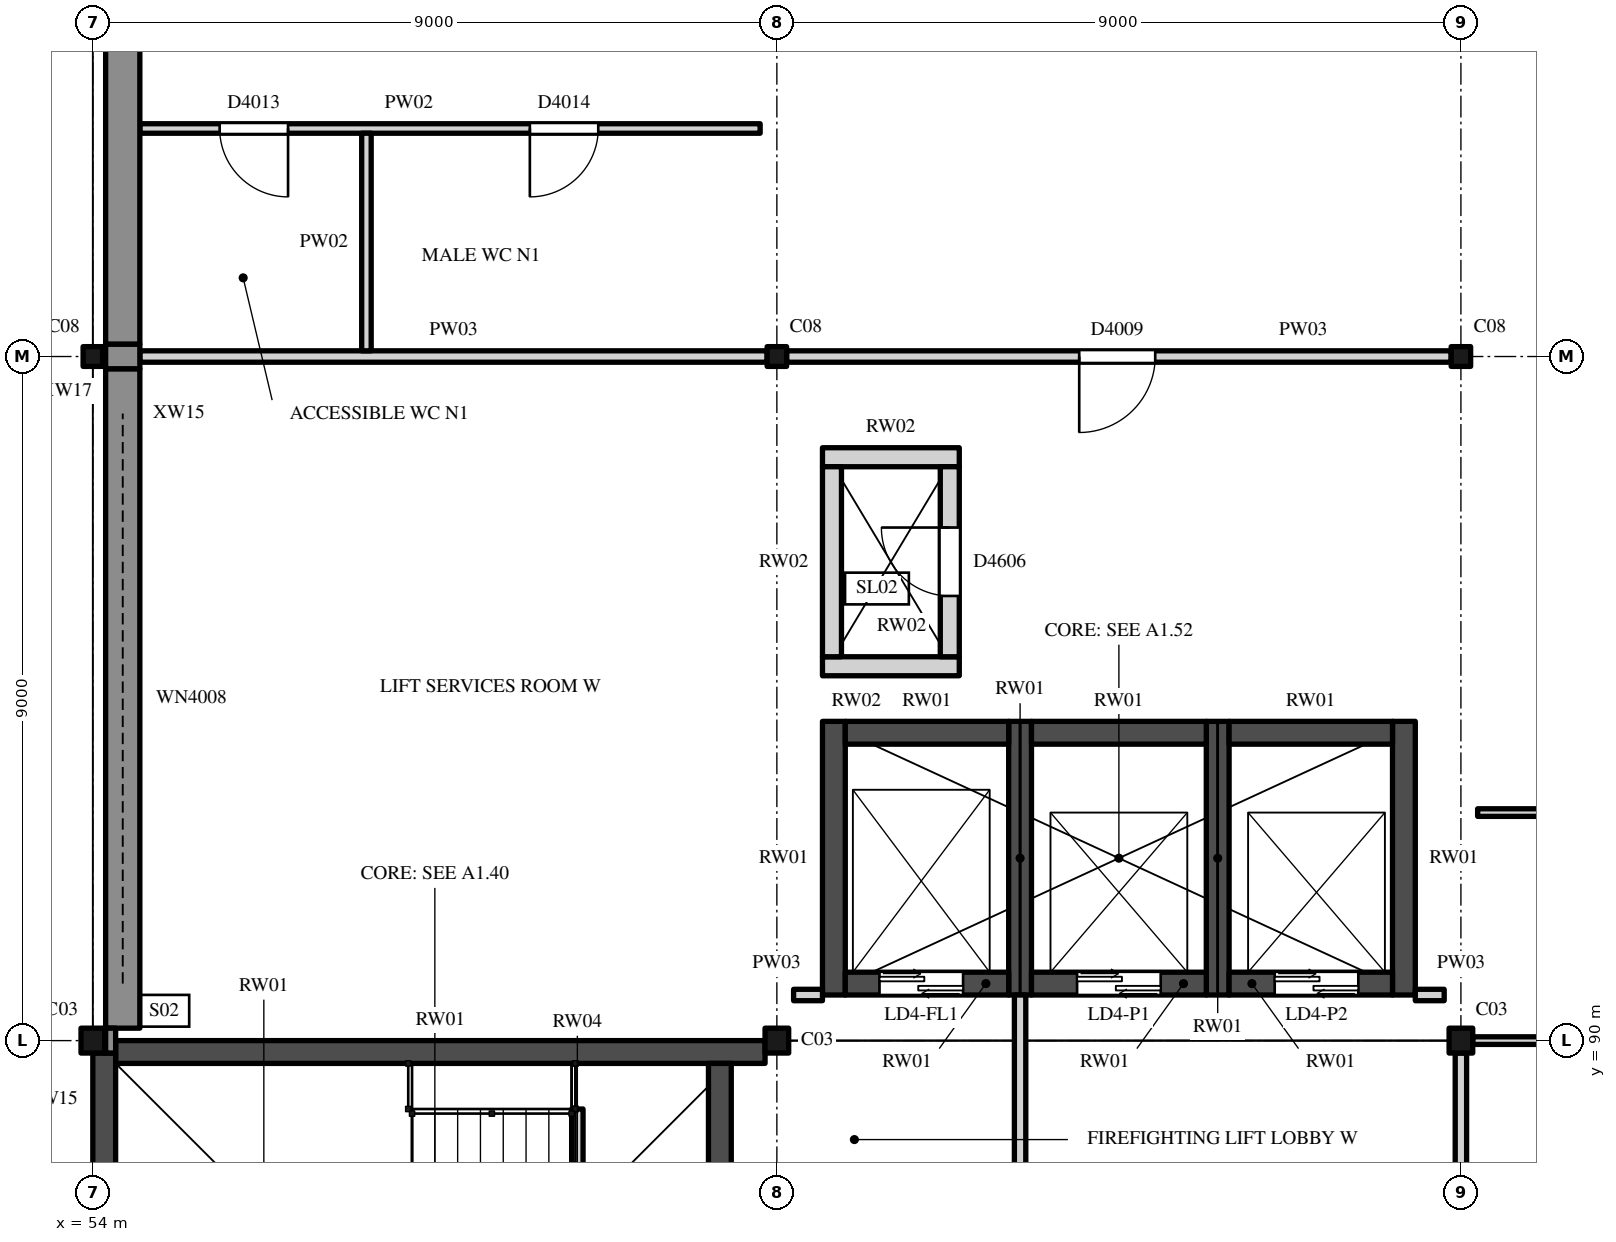
"""IFC4 building model, lengths in metres.
Left out: names, types, materials, properties, quantities, classifications, styles, units other than length and angle.
Written with IfcOpenShell. Run it as: python <this file> out.ifc"""

import sys

from ifc_helpers import new_model, si_unit, direction, frame, frame_2d, origin, origin_2d, place, context, subcontext, project, spatial, rectangle, i_section, extrude, element, fill, save


model = new_model("IFC4")
c1 = context("Model", 3, precision=1e-05, world=origin(), true_north=direction((0.0, 1.0)))
c2 = subcontext(c1, "Body", "Model", "MODEL_VIEW")
j1 = project(units=[si_unit("LENGTHUNIT", "METRE"), si_unit("PLANEANGLEUNIT", "RADIAN")], contexts=[c1])
p1 = place(None, origin())
s1 = spatial("IfcSite", under=j1, at=p1, CompositionType="ELEMENT")
p2 = place(p1, origin())
s2 = spatial("IfcBuilding", under=s1, at=p2, CompositionType="ELEMENT")
p3 = place(p2, frame((0.0, 0.0, 26.0)))
s3 = spatial("IfcBuildingStorey", under=s2, at=p3, CompositionType="ELEMENT", Elevation=26.0)
for number, where, z_axis, x_axis in (
    (1, (54.0, 90.0, 0.0), (0.0, 0.0, 1.0), (1.0, 0.0, 0.0)),
    (2, (63.0, 90.0, 0.0), (0.0, 0.0, 1.0), (1.0, 0.0, 0.0)),
    (3, (72.0, 90.0, 0.0), (0.0, 0.0, 1.0), (1.0, 0.0, 0.0)),
):
    element("IfcColumn", number, at=place(p3, frame(where, z_axis=z_axis, x_axis=x_axis)), inside=s3, PredefinedType="COLUMN", context=c2, shape_type="SweptSolid", body=[
        extrude(i_section(OverallWidth=0.311, OverallDepth=0.327, WebThickness=0.016, FlangeThickness=0.025, FilletRadius=0.017, at=origin_2d()), origin(), (0.0, 0.0, 1.0), 5.0),
    ])
for number, where, z_axis, x_axis in (
    (4, (54.0, 99.0, 0.0), (0.0, 0.0, 1.0), (1.0, 0.0, 0.0)),
    (5, (63.0, 99.0, 0.0), (0.0, 0.0, 1.0), (1.0, 0.0, 0.0)),
    (6, (72.0, 99.0, 0.0), (0.0, 0.0, 1.0), (1.0, 0.0, 0.0)),
):
    element("IfcColumn", number, at=place(p3, frame(where, z_axis=z_axis, x_axis=x_axis)), inside=s3, PredefinedType="COLUMN", context=c2, shape_type="SweptSolid", body=[
        extrude(i_section(OverallWidth=0.256, OverallDepth=0.26, WebThickness=0.01, FlangeThickness=0.017, FilletRadius=0.014, at=origin_2d()), origin(), (0.0, 0.0, 1.0), 5.0),
    ])
p4 = place(p3, frame((54.3, 89.85, 0.0), z_axis=(0.0, 0.0, 1.0), x_axis=(1.0, 0.0, 0.0)))
e7 = element("IfcWall", 7, at=p4, inside=s3, PredefinedType="SHEAR", context=c2, shape_type="SweptSolid", body=[
    extrude(rectangle(XDim=8.544, YDim=0.3, at=frame_2d((4.272, 0.0))), origin(), (0.0, 0.0, 1.0), 5.0),
])
p5 = place(p3, frame((54.15, 81.125, 0.0), z_axis=(0.0, 0.0, 1.0), x_axis=(0.0, 1.0, 0.0)))
e8 = element("IfcWall", 8, at=p5, inside=s3, PredefinedType="SHEAR", context=c2, shape_type="SweptSolid", body=[
    extrude(rectangle(XDim=8.711, YDim=0.3, at=frame_2d((4.356, 0.0))), origin(), (0.0, 0.0, 1.0), 5.0),
])
p6 = place(p3, frame((62.25, 81.9, 0.0), z_axis=(0.0, 0.0, 1.0), x_axis=(0.0, 1.0, 0.0)))
e9 = element("IfcWall", 9, at=p6, inside=s3, PredefinedType="SHEAR", context=c2, shape_type="SweptSolid", body=[
    extrude(rectangle(XDim=7.8, YDim=0.3, at=frame_2d((3.9, 0.0))), origin(), (0.0, 0.0, 1.0), 5.0),
])
p7 = place(p6, frame((3.0, 0.0, 0.0)))
e10 = element("IfcOpeningElement", 10, at=p7, cuts=e9, PredefinedType="OPENING", context=c2, shape_type="SweptSolid", body=[
    extrude(rectangle(XDim=1.2, YDim=2.1, at=frame_2d((0.6, 1.05))), frame((0.0, 0.16, 0.0), z_axis=(0.0, -1.0, 0.0), x_axis=(1.0, 0.0, 0.0)), (0.0, 0.0, 1.0), 0.32),
])
p8 = place(p3, frame((60.375, 85.5, 0.0), z_axis=(0.0, 0.0, 1.0), x_axis=(0.0, 1.0, 0.0)))
e11 = element("IfcWall", 11, at=p8, inside=s3, PredefinedType="STANDARD", context=c2, shape_type="SweptSolid", body=[
    extrude(rectangle(XDim=3.6, YDim=0.15, at=frame_2d((1.8, 0.0))), origin(), (0.0, 0.0, 1.0), 2.3),
])
for number, where, z_axis, x_axis in (
    (12, (63.75, 90.6, 0.0), (0.0, 0.0, 1.0), (0.0, 1.0, 0.0)),
    (13, (66.2, 90.6, 0.0), (0.0, 0.0, 1.0), (0.0, 1.0, 0.0)),
    (14, (68.8, 90.6, 0.0), (0.0, 0.0, 1.0), (0.0, 1.0, 0.0)),
    (15, (71.25, 90.6, 0.0), (0.0, 0.0, 1.0), (0.0, 1.0, 0.0)),
):
    element("IfcWall", number, at=place(p3, frame(where, z_axis=z_axis, x_axis=x_axis)), inside=s3, PredefinedType="SHEAR", context=c2, shape_type="SweptSolid", body=[
        extrude(rectangle(XDim=3.6, YDim=0.3, at=frame_2d((1.8, 0.0))), origin(), (0.0, 0.0, 1.0), 5.0),
    ])
p9 = place(p3, frame((63.9, 90.75, 0.0), z_axis=(0.0, 0.0, 1.0), x_axis=(1.0, 0.0, 0.0)))
e16 = element("IfcWall", 16, at=p9, inside=s3, PredefinedType="SHEAR", context=c2, shape_type="SweptSolid", body=[
    extrude(rectangle(XDim=2.15, YDim=0.3, at=frame_2d((1.075, 0.0))), origin(), (0.0, 0.0, 1.0), 5.0),
])
p10 = place(p9, frame((0.45, 0.0, 0.0)))
e17 = element("IfcOpeningElement", 17, at=p10, cuts=e16, PredefinedType="OPENING", context=c2, shape_type="SweptSolid", body=[
    extrude(rectangle(XDim=1.1, YDim=2.1, at=frame_2d((0.55, 1.05))), frame((0.0, 0.16, 0.0), z_axis=(0.0, -1.0, 0.0), x_axis=(1.0, 0.0, 0.0)), (0.0, 0.0, 1.0), 0.32),
])
p11 = place(p3, frame((63.9, 94.05, 0.0), z_axis=(0.0, 0.0, 1.0), x_axis=(1.0, 0.0, 0.0)))
e18 = element("IfcWall", 18, at=p11, inside=s3, PredefinedType="SHEAR", context=c2, shape_type="SweptSolid", body=[
    extrude(rectangle(XDim=2.15, YDim=0.3, at=frame_2d((1.075, 0.0))), origin(), (0.0, 0.0, 1.0), 5.0),
])
p12 = place(p3, frame((66.35, 90.75, 0.0), z_axis=(0.0, 0.0, 1.0), x_axis=(1.0, 0.0, 0.0)))
e19 = element("IfcWall", 19, at=p12, inside=s3, PredefinedType="SHEAR", context=c2, shape_type="SweptSolid", body=[
    extrude(rectangle(XDim=2.3, YDim=0.3, at=frame_2d((1.15, 0.0))), origin(), (0.0, 0.0, 1.0), 5.0),
])
p13 = place(p12, frame((0.6, 0.0, 0.0)))
e20 = element("IfcOpeningElement", 20, at=p13, cuts=e19, PredefinedType="OPENING", context=c2, shape_type="SweptSolid", body=[
    extrude(rectangle(XDim=1.1, YDim=2.1, at=frame_2d((0.55, 1.05))), frame((0.0, 0.16, 0.0), z_axis=(0.0, -1.0, 0.0), x_axis=(1.0, 0.0, 0.0)), (0.0, 0.0, 1.0), 0.32),
])
p14 = place(p3, frame((66.35, 94.05, 0.0), z_axis=(0.0, 0.0, 1.0), x_axis=(1.0, 0.0, 0.0)))
e21 = element("IfcWall", 21, at=p14, inside=s3, PredefinedType="SHEAR", context=c2, shape_type="SweptSolid", body=[
    extrude(rectangle(XDim=2.3, YDim=0.3, at=frame_2d((1.15, 0.0))), origin(), (0.0, 0.0, 1.0), 5.0),
])
p15 = place(p3, frame((68.95, 90.75, 0.0), z_axis=(0.0, 0.0, 1.0), x_axis=(1.0, 0.0, 0.0)))
e22 = element("IfcWall", 22, at=p15, inside=s3, PredefinedType="SHEAR", context=c2, shape_type="SweptSolid", body=[
    extrude(rectangle(XDim=2.15, YDim=0.3, at=frame_2d((1.075, 0.0))), origin(), (0.0, 0.0, 1.0), 5.0),
])
p16 = place(p15, frame((0.6, 0.0, 0.0)))
e23 = element("IfcOpeningElement", 23, at=p16, cuts=e22, PredefinedType="OPENING", context=c2, shape_type="SweptSolid", body=[
    extrude(rectangle(XDim=1.1, YDim=2.1, at=frame_2d((0.55, 1.05))), frame((0.0, 0.16, 0.0), z_axis=(0.0, -1.0, 0.0), x_axis=(1.0, 0.0, 0.0)), (0.0, 0.0, 1.0), 0.32),
])
p17 = place(p3, frame((68.95, 94.05, 0.0), z_axis=(0.0, 0.0, 1.0), x_axis=(1.0, 0.0, 0.0)))
e24 = element("IfcWall", 24, at=p17, inside=s3, PredefinedType="SHEAR", context=c2, shape_type="SweptSolid", body=[
    extrude(rectangle(XDim=2.15, YDim=0.3, at=frame_2d((1.075, 0.0))), origin(), (0.0, 0.0, 1.0), 5.0),
])
for number, where, z_axis, x_axis in (
    (25, (63.6, 94.925, 0.0), (0.0, 0.0, 1.0), (1.0, 0.0, 0.0)),
    (26, (63.6, 97.675, 0.0), (0.0, 0.0, 1.0), (1.0, 0.0, 0.0)),
):
    element("IfcWall", number, at=place(p3, frame(where, z_axis=z_axis, x_axis=x_axis)), inside=s3, PredefinedType="STANDARD", context=c2, shape_type="SweptSolid", body=[
        extrude(rectangle(XDim=1.8, YDim=0.25, at=frame_2d((0.9, 0.0))), origin(), (0.0, 0.0, 1.0), 5.0),
    ])
p18 = place(p3, frame((63.725, 95.05, 0.0), z_axis=(0.0, 0.0, 1.0), x_axis=(0.0, 1.0, 0.0)))
e27 = element("IfcWall", 27, at=p18, inside=s3, PredefinedType="STANDARD", context=c2, shape_type="SweptSolid", body=[
    extrude(rectangle(XDim=2.5, YDim=0.25, at=frame_2d((1.25, 0.0))), origin(), (0.0, 0.0, 1.0), 5.0),
])
p19 = place(p3, frame((65.275, 95.05, 0.0), z_axis=(0.0, 0.0, 1.0), x_axis=(0.0, 1.0, 0.0)))
e28 = element("IfcWall", 28, at=p19, inside=s3, PredefinedType="STANDARD", context=c2, shape_type="SweptSolid", body=[
    extrude(rectangle(XDim=2.5, YDim=0.25, at=frame_2d((1.25, 0.0))), origin(), (0.0, 0.0, 1.0), 5.0),
])
p20 = place(p19, frame((0.8, 0.0, 0.0)))
e29 = element("IfcOpeningElement", 29, at=p20, cuts=e28, PredefinedType="OPENING", context=c2, shape_type="SweptSolid", body=[
    extrude(rectangle(XDim=0.9, YDim=2.1, at=frame_2d((0.45, 1.05))), frame((0.0, 0.135, 0.0), z_axis=(0.0, -1.0, 0.0), x_axis=(1.0, 0.0, 0.0)), (0.0, 0.0, 1.0), 0.27),
])
p21 = place(p3, frame((54.394, 90.164, 0.0), z_axis=(0.0, 0.0, 1.0), x_axis=(0.0, 1.0, 0.0)))
e30 = element("IfcWall", 30, at=p21, inside=s3, PredefinedType="SOLIDWALL", context=c2, shape_type="SweptSolid", body=[
    extrude(rectangle(XDim=8.676, YDim=0.45, at=frame_2d((4.338, 0.0))), origin(), (0.0, 0.0, 1.0), 4.498),
])
p22 = place(p21, frame((0.586, 0.0, 1.6)))
e31 = element("IfcOpeningElement", 31, at=p22, cuts=e30, PredefinedType="OPENING", context=c2, shape_type="SweptSolid", body=[
    extrude(rectangle(XDim=7.5, YDim=1.2, at=frame_2d((3.75, 0.6))), frame((0.0, 0.235, 0.0), z_axis=(0.0, -1.0, 0.0), x_axis=(1.0, 0.0, 0.0)), (0.0, 0.0, 1.0), 0.47),
])
p23 = place(p3, frame((54.394, 99.161, 0.0), z_axis=(0.0, 0.0, 1.0), x_axis=(0.0, 1.0, 0.0)))
e32 = element("IfcWall", 32, at=p23, inside=s3, PredefinedType="SOLIDWALL", context=c2, shape_type="SweptSolid", body=[
    extrude(rectangle(XDim=8.678, YDim=0.45, at=frame_2d((4.339, 0.0))), origin(), (0.0, 0.0, 1.0), 4.498),
])
p24 = place(p3, frame((54.234, 89.836, 0.0), z_axis=(0.0, 0.0, 1.0), x_axis=(0.0, 1.0, 0.0)))
e33 = element("IfcWall", 33, at=p24, inside=s3, PredefinedType="SOLIDWALL", context=c2, shape_type="SweptSolid", body=[
    extrude(rectangle(XDim=0.327, YDim=0.131, at=frame_2d((0.164, 0.0))), origin(), (0.0, 0.0, 1.0), 5.0),
])
p25 = place(p3, frame((54.394, 98.839, 0.0), z_axis=(0.0, 0.0, 1.0), x_axis=(0.0, 1.0, 0.0)))
e34 = element("IfcWall", 34, at=p25, inside=s3, PredefinedType="SOLIDWALL", context=c2, shape_type="SweptSolid", body=[
    extrude(rectangle(XDim=0.322, YDim=0.45, at=frame_2d((0.161, 0.0))), origin(), (0.0, 0.0, 1.0), 4.498),
])
p26 = place(p3, frame((72.156, 90.0, 0.0), z_axis=(0.0, 0.0, 1.0), x_axis=(1.0, 0.0, 0.0)))
e35 = element("IfcWall", 35, at=p26, inside=s3, PredefinedType="PARTITIONING", context=c2, shape_type="SweptSolid", body=[
    extrude(rectangle(XDim=8.689, YDim=0.1, at=frame_2d((4.344, 0.0))), origin(), (0.0, 0.0, 1.0), 4.518),
])
p27 = place(p26, frame((3.15, 0.0, 0.0)))
e36 = element("IfcOpeningElement", 36, at=p27, cuts=e35, PredefinedType="OPENING", context=c2, shape_type="SweptSolid", body=[
    extrude(rectangle(XDim=2.4, YDim=2.4, at=frame_2d((1.2, 1.2))), frame((0.0, 0.06, 0.0), z_axis=(0.0, -1.0, 0.0), x_axis=(1.0, 0.0, 0.0)), (0.0, 0.0, 1.0), 0.12),
])
for number, where, z_axis, x_axis in (
    (37, (63.22, 90.6, 0.0), (0.0, 0.0, 1.0), (1.0, 0.0, 0.0)),
    (38, (71.4, 90.6, 0.0), (0.0, 0.0, 1.0), (1.0, 0.0, 0.0)),
):
    element("IfcWall", number, at=place(p3, frame(where, z_axis=z_axis, x_axis=x_axis)), inside=s3, PredefinedType="PARTITIONING", context=c2, shape_type="SweptSolid", body=[
        extrude(rectangle(XDim=0.38, YDim=0.15, at=frame_2d((0.19, 0.0))), origin(), (0.0, 0.0, 1.0), 4.825),
    ])
p28 = place(p3, frame((72.22, 93.0, 0.0), z_axis=(0.0, 0.0, 1.0), x_axis=(1.0, 0.0, 0.0)))
e39 = element("IfcWall", 39, at=p28, inside=s3, PredefinedType="PARTITIONING", context=c2, shape_type="SweptSolid", body=[
    extrude(rectangle(XDim=8.56, YDim=0.1, at=frame_2d((4.28, 0.0))), origin(), (0.0, 0.0, 1.0), 4.521),
])
p29 = place(p3, frame((54.619, 99.0, 0.0), z_axis=(0.0, 0.0, 1.0), x_axis=(1.0, 0.0, 0.0)))
e40 = element("IfcWall", 40, at=p29, inside=s3, PredefinedType="PARTITIONING", context=c2, shape_type="SweptSolid", body=[
    extrude(rectangle(XDim=8.253, YDim=0.15, at=frame_2d((4.127, 0.0))), origin(), (0.0, 0.0, 1.0), 4.518),
])
p30 = place(p3, frame((63.128, 99.0, 0.0), z_axis=(0.0, 0.0, 1.0), x_axis=(1.0, 0.0, 0.0)))
e41 = element("IfcWall", 41, at=p30, inside=s3, PredefinedType="PARTITIONING", context=c2, shape_type="SweptSolid", body=[
    extrude(rectangle(XDim=8.744, YDim=0.15, at=frame_2d((4.372, 0.0))), origin(), (0.0, 0.0, 1.0), 4.518),
])
p31 = place(p30, frame((3.85, 0.0, 0.0)))
e42 = element("IfcOpeningElement", 42, at=p31, cuts=e41, PredefinedType="OPENING", context=c2, shape_type="SweptSolid", body=[
    extrude(rectangle(XDim=1.0, YDim=2.4, at=frame_2d((0.5, 1.2))), frame((0.0, 0.085, 0.0), z_axis=(0.0, -1.0, 0.0), x_axis=(1.0, 0.0, 0.0)), (0.0, 0.0, 1.0), 0.17),
])
p32 = place(p3, frame((54.619, 102.0, 0.0), z_axis=(0.0, 0.0, 1.0), x_axis=(1.0, 0.0, 0.0)))
e43 = element("IfcWall", 43, at=p32, inside=s3, PredefinedType="PARTITIONING", context=c2, shape_type="SweptSolid", body=[
    extrude(rectangle(XDim=8.161, YDim=0.125, at=frame_2d((4.081, 0.0))), origin(), (0.0, 0.0, 1.0), 4.521),
])
p33 = place(p32, frame((1.05, 0.0, 0.0)))
e44 = element("IfcOpeningElement", 44, at=p33, cuts=e43, PredefinedType="OPENING", context=c2, shape_type="SweptSolid", body=[
    extrude(rectangle(XDim=0.9, YDim=2.1, at=frame_2d((0.45, 1.05))), frame((0.0, 0.073, 0.0), z_axis=(0.0, -1.0, 0.0), x_axis=(1.0, 0.0, 0.0)), (0.0, 0.0, 1.0), 0.145),
])
p34 = place(p32, frame((5.131, 0.0, 0.0)))
e45 = element("IfcOpeningElement", 45, at=p34, cuts=e43, PredefinedType="OPENING", context=c2, shape_type="SweptSolid", body=[
    extrude(rectangle(XDim=0.9, YDim=2.1, at=frame_2d((0.45, 1.05))), frame((0.0, 0.073, 0.0), z_axis=(0.0, -1.0, 0.0), x_axis=(1.0, 0.0, 0.0)), (0.0, 0.0, 1.0), 0.145),
])
p35 = place(p3, frame((57.6, 99.075, 0.0), z_axis=(0.0, 0.0, 1.0), x_axis=(0.0, 1.0, 0.0)))
e46 = element("IfcWall", 46, at=p35, inside=s3, PredefinedType="PARTITIONING", context=c2, shape_type="SweptSolid", body=[
    extrude(rectangle(XDim=2.863, YDim=0.125, at=frame_2d((1.431, 0.0))), origin(), (0.0, 0.0, 1.0), 4.825),
])
p36 = place(p3, frame((66.2, 84.075, 0.0), z_axis=(0.0, 0.0, 1.0), x_axis=(0.0, 1.0, 0.0)))
e47 = element("IfcWall", 47, at=p36, inside=s3, PredefinedType="PARTITIONING", context=c2, shape_type="SweptSolid", body=[
    extrude(rectangle(XDim=6.525, YDim=0.15, at=frame_2d((3.263, 0.0))), origin(), (0.0, 0.0, 1.0), 4.825),
])
p37 = place(p36, frame((2.85, 0.0, 0.0)))
e48 = element("IfcOpeningElement", 48, at=p37, cuts=e47, PredefinedType="OPENING", context=c2, shape_type="SweptSolid", body=[
    extrude(rectangle(XDim=0.9, YDim=2.1, at=frame_2d((0.45, 1.05))), frame((0.0, 0.085, 0.0), z_axis=(0.0, -1.0, 0.0), x_axis=(1.0, 0.0, 0.0)), (0.0, 0.0, 1.0), 0.17),
])
p38 = place(p3, frame((72.0, 84.075, 0.0), z_axis=(0.0, 0.0, 1.0), x_axis=(0.0, 1.0, 0.0)))
e49 = element("IfcWall", 49, at=p38, inside=s3, PredefinedType="PARTITIONING", context=c2, shape_type="SweptSolid", body=[
    extrude(rectangle(XDim=5.761, YDim=0.15, at=frame_2d((2.881, 0.0))), origin(), (0.0, 0.0, 1.0), 4.419),
])
p39 = place(p10, origin())
e50 = element("IfcDoor", 50, at=p39, inside=s3, OperationType="DOUBLE_DOOR_SLIDING", PredefinedType="DOOR", context=c2, shape_type="SweptSolid", body=[
    extrude(rectangle(XDim=1.1, YDim=2.1, at=frame_2d((0.55, 1.05))), frame((0.0, 0.025, 0.0), z_axis=(0.0, -1.0, 0.0), x_axis=(1.0, 0.0, 0.0)), (0.0, 0.0, 1.0), 0.05),
])
fill(e17, e50)
p40 = place(p13, origin())
e51 = element("IfcDoor", 51, at=p40, inside=s3, OperationType="DOUBLE_DOOR_SLIDING", PredefinedType="DOOR", context=c2, shape_type="SweptSolid", body=[
    extrude(rectangle(XDim=1.1, YDim=2.1, at=frame_2d((0.55, 1.05))), frame((0.0, 0.025, 0.0), z_axis=(0.0, -1.0, 0.0), x_axis=(1.0, 0.0, 0.0)), (0.0, 0.0, 1.0), 0.05),
])
fill(e20, e51)
p41 = place(p16, origin())
e52 = element("IfcDoor", 52, at=p41, inside=s3, OperationType="DOUBLE_DOOR_SLIDING", PredefinedType="DOOR", context=c2, shape_type="SweptSolid", body=[
    extrude(rectangle(XDim=1.1, YDim=2.1, at=frame_2d((0.55, 1.05))), frame((0.0, 0.025, 0.0), z_axis=(0.0, -1.0, 0.0), x_axis=(1.0, 0.0, 0.0)), (0.0, 0.0, 1.0), 0.05),
])
fill(e23, e52)
p42 = place(p20, origin())
e53 = element("IfcDoor", 53, at=p42, inside=s3, OperationType="SINGLE_SWING_LEFT", PredefinedType="DOOR", context=c2, shape_type="SweptSolid", body=[
    extrude(rectangle(XDim=0.9, YDim=2.1, at=frame_2d((0.45, 1.05))), frame((0.0, 0.025, 0.0), z_axis=(0.0, -1.0, 0.0), x_axis=(1.0, 0.0, 0.0)), (0.0, 0.0, 1.0), 0.05),
])
fill(e29, e53)
p43 = place(p22, origin())
e54 = element("IfcWindow", 54, at=p43, inside=s3, PartitioningType="SINGLE_PANEL", PredefinedType="WINDOW", context=c2, shape_type="SweptSolid", body=[
    extrude(rectangle(XDim=7.5, YDim=1.2, at=frame_2d((3.75, 0.6))), frame((0.0, 0.03, 0.0), z_axis=(0.0, -1.0, 0.0), x_axis=(1.0, 0.0, 0.0)), (0.0, 0.0, 1.0), 0.06),
])
fill(e31, e54)
p44 = place(p31, origin())
e55 = element("IfcDoor", 55, at=p44, inside=s3, OperationType="SINGLE_SWING_LEFT", PredefinedType="DOOR", context=c2, shape_type="SweptSolid", body=[
    extrude(rectangle(XDim=1.0, YDim=2.4, at=frame_2d((0.5, 1.2))), frame((0.0, 0.025, 0.0), z_axis=(0.0, -1.0, 0.0), x_axis=(1.0, 0.0, 0.0)), (0.0, 0.0, 1.0), 0.05),
])
fill(e42, e55)
p45 = place(p33, origin())
e56 = element("IfcDoor", 56, at=p45, inside=s3, OperationType="SINGLE_SWING_RIGHT", PredefinedType="DOOR", context=c2, shape_type="SweptSolid", body=[
    extrude(rectangle(XDim=0.9, YDim=2.1, at=frame_2d((0.45, 1.05))), frame((0.0, 0.025, 0.0), z_axis=(0.0, -1.0, 0.0), x_axis=(1.0, 0.0, 0.0)), (0.0, 0.0, 1.0), 0.05),
])
fill(e44, e56)
p46 = place(p34, origin())
e57 = element("IfcDoor", 57, at=p46, inside=s3, OperationType="SINGLE_SWING_LEFT", PredefinedType="DOOR", context=c2, shape_type="SweptSolid", body=[
    extrude(rectangle(XDim=0.9, YDim=2.1, at=frame_2d((0.45, 1.05))), frame((0.0, 0.025, 0.0), z_axis=(0.0, -1.0, 0.0), x_axis=(1.0, 0.0, 0.0)), (0.0, 0.0, 1.0), 0.05),
])
fill(e45, e57)
save(model, sys.argv[1])
